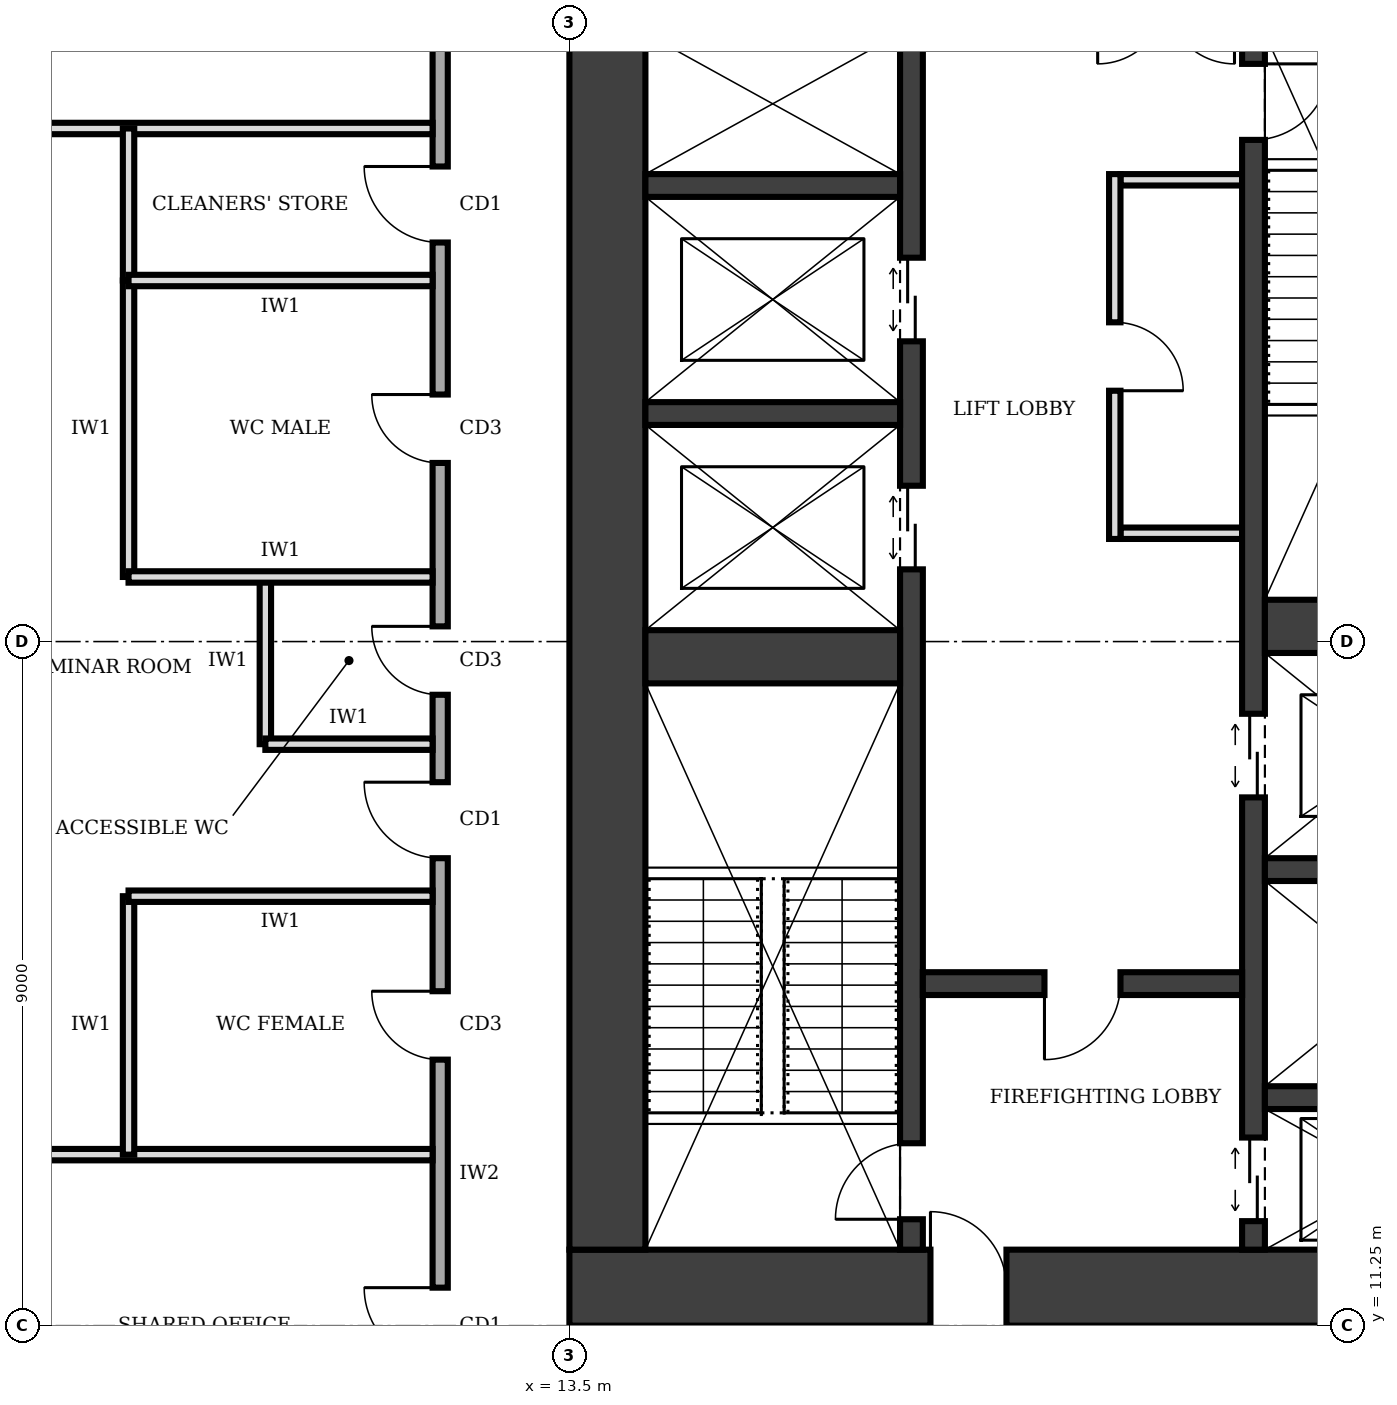
"""IFC4 building model, lengths in metres.
Left out: names, types, materials, properties, quantities, classifications, styles, units other than length and angle.
Written with IfcOpenShell. Run it as: python <this file> out.ifc"""

import sys

from ifc_helpers import new_model, si_unit, direction, frame, frame_2d, origin, place, context, subcontext, project, spatial, rectangle, extrude, element, fill, save


model = new_model("IFC4")
c1 = context("Model", 3, precision=1e-05, world=origin(), true_north=direction((0.0, 1.0)))
c2 = subcontext(c1, "Body", "Model", "MODEL_VIEW")
j1 = project(units=[si_unit("LENGTHUNIT", "METRE"), si_unit("PLANEANGLEUNIT", "RADIAN")], contexts=[c1])
p1 = place(None, origin())
s1 = spatial("IfcSite", under=j1, at=p1, CompositionType="ELEMENT")
p2 = place(p1, origin())
s2 = spatial("IfcBuilding", under=s1, at=p2, CompositionType="ELEMENT")
p3 = place(p2, frame((0.0, 0.0, 53.0)))
s3 = spatial("IfcBuildingStorey", under=s2, at=p3, CompositionType="ELEMENT", Elevation=53.0)
p4 = place(p3, frame((13.5, 11.75, 0.0), z_axis=(0.0, 0.0, 1.0), x_axis=(1.0, 0.0, 0.0)))
e1 = element("IfcWall", 1, at=p4, inside=s3, PredefinedType="SHEAR", context=c2, shape_type="SweptSolid", body=[
    extrude(rectangle(XDim=13.5, YDim=1.0, at=frame_2d((6.75, 0.0))), origin(), (0.0, 0.0, 1.0), 4.0),
])
p5 = place(p4, frame((4.75, 0.0, 0.0)))
e2 = element("IfcOpeningElement", 2, at=p5, cuts=e1, PredefinedType="OPENING", context=c2, shape_type="SweptSolid", body=[
    extrude(rectangle(XDim=1.0, YDim=2.1, at=frame_2d((0.5, 1.05))), frame((0.0, 0.51, 0.0), z_axis=(0.0, -1.0, 0.0), x_axis=(1.0, 0.0, 0.0)), (0.0, 0.0, 1.0), 1.02),
])
p6 = place(p3, frame((14.0, 28.25, 0.0), z_axis=(0.0, 0.0, 1.0), x_axis=(0.0, -1.0, 0.0)))
e3 = element("IfcWall", 3, at=p6, inside=s3, PredefinedType="SHEAR", context=c2, shape_type="SweptSolid", body=[
    extrude(rectangle(XDim=16.0, YDim=1.0, at=frame_2d((8.0, 0.0))), origin(), (0.0, 0.0, 1.0), 4.0),
])
p7 = place(p3, frame((18.0, 12.25, 0.0), z_axis=(0.0, 0.0, 1.0), x_axis=(0.0, 1.0, 0.0)))
e4 = element("IfcWall", 4, at=p7, inside=s3, PredefinedType="SHEAR", context=c2, shape_type="SweptSolid", body=[
    extrude(rectangle(XDim=16.0, YDim=0.3, at=frame_2d((8.0, 0.0))), origin(), (0.0, 0.0, 1.0), 4.0),
])
p8 = place(p7, frame((0.4, 0.0, 0.0)))
e5 = element("IfcOpeningElement", 5, at=p8, cuts=e4, PredefinedType="OPENING", context=c2, shape_type="SweptSolid", body=[
    extrude(rectangle(XDim=1.0, YDim=2.1, at=frame_2d((0.5, 1.05))), frame((0.0, 0.16, 0.0), z_axis=(0.0, -1.0, 0.0), x_axis=(1.0, 0.0, 0.0)), (0.0, 0.0, 1.0), 0.32),
])
p9 = place(p7, frame((8.95, 0.0, 0.0)))
e6 = element("IfcOpeningElement", 6, at=p9, cuts=e4, PredefinedType="OPENING", context=c2, shape_type="SweptSolid", body=[
    extrude(rectangle(XDim=1.1, YDim=2.1, at=frame_2d((0.55, 1.05))), frame((0.0, 0.16, 0.0), z_axis=(0.0, -1.0, 0.0), x_axis=(1.0, 0.0, 0.0)), (0.0, 0.0, 1.0), 0.32),
])
p10 = place(p7, frame((11.95, 0.0, 0.0)))
e7 = element("IfcOpeningElement", 7, at=p10, cuts=e4, PredefinedType="OPENING", context=c2, shape_type="SweptSolid", body=[
    extrude(rectangle(XDim=1.1, YDim=2.1, at=frame_2d((0.55, 1.05))), frame((0.0, 0.16, 0.0), z_axis=(0.0, -1.0, 0.0), x_axis=(1.0, 0.0, 0.0)), (0.0, 0.0, 1.0), 0.32),
])
p11 = place(p3, frame((22.5, 12.25, 0.0), z_axis=(0.0, 0.0, 1.0), x_axis=(0.0, 1.0, 0.0)))
e8 = element("IfcWall", 8, at=p11, inside=s3, PredefinedType="SHEAR", context=c2, shape_type="SweptSolid", body=[
    extrude(rectangle(XDim=16.0, YDim=0.3, at=frame_2d((8.0, 0.0))), origin(), (0.0, 0.0, 1.0), 4.0),
])
p12 = place(p11, frame((14.6, 0.0, 0.0)))
e9 = element("IfcOpeningElement", 9, at=p12, cuts=e8, PredefinedType="OPENING", context=c2, shape_type="SweptSolid", body=[
    extrude(rectangle(XDim=1.0, YDim=2.1, at=frame_2d((0.5, 1.05))), frame((0.0, 0.16, 0.0), z_axis=(0.0, -1.0, 0.0), x_axis=(1.0, 0.0, 0.0)), (0.0, 0.0, 1.0), 0.32),
])
p13 = place(p11, frame((0.375, 0.0, 0.0)))
e10 = element("IfcOpeningElement", 10, at=p13, cuts=e8, PredefinedType="OPENING", context=c2, shape_type="SweptSolid", body=[
    extrude(rectangle(XDim=1.1, YDim=2.1, at=frame_2d((0.55, 1.05))), frame((0.0, 0.16, 0.0), z_axis=(0.0, -1.0, 0.0), x_axis=(1.0, 0.0, 0.0)), (0.0, 0.0, 1.0), 0.32),
])
p14 = place(p11, frame((5.95, 0.0, 0.0)))
e11 = element("IfcOpeningElement", 11, at=p14, cuts=e8, PredefinedType="OPENING", context=c2, shape_type="SweptSolid", body=[
    extrude(rectangle(XDim=1.1, YDim=2.1, at=frame_2d((0.55, 1.05))), frame((0.0, 0.16, 0.0), z_axis=(0.0, -1.0, 0.0), x_axis=(1.0, 0.0, 0.0)), (0.0, 0.0, 1.0), 0.32),
])
p15 = place(p3, frame((14.5, 20.05, 0.0), z_axis=(0.0, 0.0, 1.0), x_axis=(1.0, 0.0, 0.0)))
e12 = element("IfcWall", 12, at=p15, inside=s3, PredefinedType="SHEAR", context=c2, shape_type="SweptSolid", body=[
    extrude(rectangle(XDim=3.35, YDim=0.7, at=frame_2d((1.675, 0.0))), origin(), (0.0, 0.0, 1.0), 4.0),
])
p16 = place(p3, frame((18.15, 15.75, 0.0), z_axis=(0.0, 0.0, 1.0), x_axis=(1.0, 0.0, 0.0)))
e13 = element("IfcWall", 13, at=p16, inside=s3, PredefinedType="SHEAR", context=c2, shape_type="SweptSolid", body=[
    extrude(rectangle(XDim=4.2, YDim=0.3, at=frame_2d((2.1, 0.0))), origin(), (0.0, 0.0, 1.0), 4.0),
])
p17 = place(p16, frame((1.6, 0.0, 0.0)))
e14 = element("IfcOpeningElement", 14, at=p17, cuts=e13, PredefinedType="OPENING", context=c2, shape_type="SweptSolid", body=[
    extrude(rectangle(XDim=1.0, YDim=2.1, at=frame_2d((0.5, 1.05))), frame((0.0, 0.16, 0.0), z_axis=(0.0, -1.0, 0.0), x_axis=(1.0, 0.0, 0.0)), (0.0, 0.0, 1.0), 0.32),
])
for number, where, z_axis, x_axis in (
    (15, (22.65, 14.25, 0.0), (0.0, 0.0, 1.0), (1.0, 0.0, 0.0)),
    (16, (22.65, 17.25, 0.0), (0.0, 0.0, 1.0), (1.0, 0.0, 0.0)),
):
    element("IfcWall", number, at=place(p3, frame(where, z_axis=z_axis, x_axis=x_axis)), inside=s3, PredefinedType="SHEAR", context=c2, shape_type="SweptSolid", body=[
        extrude(rectangle(XDim=3.35, YDim=0.3, at=frame_2d((1.675, 0.0))), origin(), (0.0, 0.0, 1.0), 4.0),
    ])
p18 = place(p3, frame((22.65, 20.45, 0.0), z_axis=(0.0, 0.0, 1.0), x_axis=(1.0, 0.0, 0.0)))
e17 = element("IfcWall", 17, at=p18, inside=s3, PredefinedType="SHEAR", context=c2, shape_type="SweptSolid", body=[
    extrude(rectangle(XDim=3.35, YDim=0.7, at=frame_2d((1.675, 0.0))), origin(), (0.0, 0.0, 1.0), 4.0),
])
for number, where, z_axis, x_axis in (
    (18, (14.5, 23.25, 0.0), (0.0, 0.0, 1.0), (1.0, 0.0, 0.0)),
    (19, (14.5, 26.25, 0.0), (0.0, 0.0, 1.0), (1.0, 0.0, 0.0)),
):
    element("IfcWall", number, at=place(p3, frame(where, z_axis=z_axis, x_axis=x_axis)), inside=s3, PredefinedType="SHEAR", context=c2, shape_type="SweptSolid", body=[
        extrude(rectangle(XDim=3.35, YDim=0.3, at=frame_2d((1.675, 0.0))), origin(), (0.0, 0.0, 1.0), 4.0),
    ])
p19 = place(p3, frame((20.675, 21.6, 0.0), z_axis=(0.0, 0.0, 1.0), x_axis=(0.0, 1.0, 0.0)))
e20 = element("IfcWall", 20, at=p19, inside=s3, PredefinedType="PARTITIONING", context=c2, shape_type="SweptSolid", body=[
    extrude(rectangle(XDim=4.8, YDim=0.15, at=frame_2d((2.4, 0.0))), origin(), (0.0, 0.0, 1.0), 3.75),
])
p20 = place(p19, frame((1.95, 0.0, 0.0)))
e21 = element("IfcOpeningElement", 21, at=p20, cuts=e20, PredefinedType="OPENING", context=c2, shape_type="SweptSolid", body=[
    extrude(rectangle(XDim=0.9, YDim=2.1, at=frame_2d((0.45, 1.05))), frame((0.0, 0.085, 0.0), z_axis=(0.0, -1.0, 0.0), x_axis=(1.0, 0.0, 0.0)), (0.0, 0.0, 1.0), 0.17),
])
for number, where, z_axis, x_axis in (
    (22, (20.75, 21.675, 0.0), (0.0, 0.0, 1.0), (1.0, 0.0, 0.0)),
    (23, (20.75, 26.325, 0.0), (0.0, 0.0, 1.0), (1.0, 0.0, 0.0)),
):
    element("IfcWall", number, at=place(p3, frame(where, z_axis=z_axis, x_axis=x_axis)), inside=s3, PredefinedType="PARTITIONING", context=c2, shape_type="SweptSolid", body=[
        extrude(rectangle(XDim=1.6, YDim=0.15, at=frame_2d((0.8, 0.0))), origin(), (0.0, 0.0, 1.0), 3.75),
    ])
p21 = place(p3, frame((11.8, 32.8, 0.0), z_axis=(0.0, 0.0, 1.0), x_axis=(0.0, -1.0, 0.0)))
e24 = element("IfcWall", 24, at=p21, inside=s3, PredefinedType="SOLIDWALL", context=c2, shape_type="SweptSolid", body=[
    extrude(rectangle(XDim=23.8, YDim=0.2, at=frame_2d((11.9, 0.0))), origin(), (0.0, 0.0, 1.0), 3.75),
])
p22 = place(p21, frame((21.05, 0.0, 0.0)))
e25 = element("IfcOpeningElement", 25, at=p22, cuts=e24, PredefinedType="OPENING", context=c2, shape_type="SweptSolid", body=[
    extrude(rectangle(XDim=1.0, YDim=2.1, at=frame_2d((0.5, 1.05))), frame((0.0, 0.11, 0.0), z_axis=(0.0, -1.0, 0.0), x_axis=(1.0, 0.0, 0.0)), (0.0, 0.0, 1.0), 0.22),
])
p23 = place(p21, frame((17.15, 0.0, 0.0)))
e26 = element("IfcOpeningElement", 26, at=p23, cuts=e24, PredefinedType="OPENING", context=c2, shape_type="SweptSolid", body=[
    extrude(rectangle(XDim=0.9, YDim=2.1, at=frame_2d((0.45, 1.05))), frame((0.0, 0.11, 0.0), z_axis=(0.0, -1.0, 0.0), x_axis=(1.0, 0.0, 0.0)), (0.0, 0.0, 1.0), 0.22),
])
p24 = place(p21, frame((12.35, 0.0, 0.0)))
e27 = element("IfcOpeningElement", 27, at=p24, cuts=e24, PredefinedType="OPENING", context=c2, shape_type="SweptSolid", body=[
    extrude(rectangle(XDim=0.9, YDim=2.1, at=frame_2d((0.45, 1.05))), frame((0.0, 0.11, 0.0), z_axis=(0.0, -1.0, 0.0), x_axis=(1.0, 0.0, 0.0)), (0.0, 0.0, 1.0), 0.22),
])
p25 = place(p21, frame((9.3, 0.0, 0.0)))
e28 = element("IfcOpeningElement", 28, at=p25, cuts=e24, PredefinedType="OPENING", context=c2, shape_type="SweptSolid", body=[
    extrude(rectangle(XDim=0.9, YDim=2.1, at=frame_2d((0.45, 1.05))), frame((0.0, 0.11, 0.0), z_axis=(0.0, -1.0, 0.0), x_axis=(1.0, 0.0, 0.0)), (0.0, 0.0, 1.0), 0.22),
])
p26 = place(p21, frame((6.3, 0.0, 0.0)))
e29 = element("IfcOpeningElement", 29, at=p26, cuts=e24, PredefinedType="OPENING", context=c2, shape_type="SweptSolid", body=[
    extrude(rectangle(XDim=1.0, YDim=2.1, at=frame_2d((0.5, 1.05))), frame((0.0, 0.11, 0.0), z_axis=(0.0, -1.0, 0.0), x_axis=(1.0, 0.0, 0.0)), (0.0, 0.0, 1.0), 0.22),
])
p27 = place(p21, frame((14.4, 0.0, 0.0)))
e30 = element("IfcOpeningElement", 30, at=p27, cuts=e24, PredefinedType="OPENING", context=c2, shape_type="SweptSolid", body=[
    extrude(rectangle(XDim=1.0, YDim=2.1, at=frame_2d((0.5, 1.05))), frame((0.0, 0.11, 0.0), z_axis=(0.0, -1.0, 0.0), x_axis=(1.0, 0.0, 0.0)), (0.0, 0.0, 1.0), 0.22),
])
p28 = place(p21, frame((2.3, 0.0, 0.0)))
e31 = element("IfcOpeningElement", 31, at=p28, cuts=e24, PredefinedType="OPENING", context=c2, shape_type="SweptSolid", body=[
    extrude(rectangle(XDim=1.0, YDim=2.1, at=frame_2d((0.5, 1.05))), frame((0.0, 0.11, 0.0), z_axis=(0.0, -1.0, 0.0), x_axis=(1.0, 0.0, 0.0)), (0.0, 0.0, 1.0), 0.22),
])
for number, where, z_axis, x_axis in (
    (32, (0.3, 13.5, 0.0), (0.0, 0.0, 1.0), (1.0, 0.0, 0.0)),
    (33, (0.3, 27.0, 0.0), (0.0, 0.0, 1.0), (1.0, 0.0, 0.0)),
):
    element("IfcWall", number, at=place(p3, frame(where, z_axis=z_axis, x_axis=x_axis)), inside=s3, PredefinedType="PARTITIONING", context=c2, shape_type="SweptSolid", body=[
        extrude(rectangle(XDim=11.4, YDim=0.15, at=frame_2d((5.7, 0.0))), origin(), (0.0, 0.0, 1.0), 3.75),
    ])
p29 = place(p3, frame((11.7, 16.9, 0.0), z_axis=(0.0, 0.0, 1.0), x_axis=(-1.0, 0.0, 0.0)))
e34 = element("IfcWall", 34, at=p29, inside=s3, PredefinedType="PARTITIONING", context=c2, shape_type="SweptSolid", body=[
    extrude(rectangle(XDim=4.0, YDim=0.15, at=frame_2d((2.0, 0.0))), origin(), (0.0, 0.0, 1.0), 3.75),
])
p30 = place(p3, frame((11.7, 18.9, 0.0), z_axis=(0.0, 0.0, 1.0), x_axis=(-1.0, 0.0, 0.0)))
e35 = element("IfcWall", 35, at=p30, inside=s3, PredefinedType="PARTITIONING", context=c2, shape_type="SweptSolid", body=[
    extrude(rectangle(XDim=2.2, YDim=0.15, at=frame_2d((1.1, 0.0))), origin(), (0.0, 0.0, 1.0), 3.75),
])
p31 = place(p3, frame((11.7, 21.1, 0.0), z_axis=(0.0, 0.0, 1.0), x_axis=(-1.0, 0.0, 0.0)))
e36 = element("IfcWall", 36, at=p31, inside=s3, PredefinedType="PARTITIONING", context=c2, shape_type="SweptSolid", body=[
    extrude(rectangle(XDim=4.0, YDim=0.15, at=frame_2d((2.0, 0.0))), origin(), (0.0, 0.0, 1.0), 2.85),
])
p32 = place(p3, frame((11.7, 25.0, 0.0), z_axis=(0.0, 0.0, 1.0), x_axis=(-1.0, 0.0, 0.0)))
e37 = element("IfcWall", 37, at=p32, inside=s3, PredefinedType="PARTITIONING", context=c2, shape_type="SweptSolid", body=[
    extrude(rectangle(XDim=4.0, YDim=0.15, at=frame_2d((2.0, 0.0))), origin(), (0.0, 0.0, 1.0), 3.75),
])
p33 = place(p3, frame((7.7, 13.5, 0.0), z_axis=(0.0, 0.0, 1.0), x_axis=(0.0, 1.0, 0.0)))
e38 = element("IfcWall", 38, at=p33, inside=s3, PredefinedType="PARTITIONING", context=c2, shape_type="SweptSolid", body=[
    extrude(rectangle(XDim=3.4, YDim=0.15, at=frame_2d((1.7, 0.0))), origin(), (0.0, 0.0, 1.0), 3.75),
])
p34 = place(p3, frame((9.5, 18.9, 0.0), z_axis=(0.0, 0.0, 1.0), x_axis=(0.0, 1.0, 0.0)))
e39 = element("IfcWall", 39, at=p34, inside=s3, PredefinedType="PARTITIONING", context=c2, shape_type="SweptSolid", body=[
    extrude(rectangle(XDim=2.2, YDim=0.15, at=frame_2d((1.1, 0.0))), origin(), (0.0, 0.0, 1.0), 3.75),
])
p35 = place(p3, frame((7.7, 21.1, 0.0), z_axis=(0.0, 0.0, 1.0), x_axis=(0.0, 1.0, 0.0)))
e40 = element("IfcWall", 40, at=p35, inside=s3, PredefinedType="PARTITIONING", context=c2, shape_type="SweptSolid", body=[
    extrude(rectangle(XDim=3.9, YDim=0.15, at=frame_2d((1.95, 0.0))), origin(), (0.0, 0.0, 1.0), 3.75),
])
p36 = place(p3, frame((7.7, 25.0, 0.0), z_axis=(0.0, 0.0, 1.0), x_axis=(0.0, 1.0, 0.0)))
e41 = element("IfcWall", 41, at=p36, inside=s3, PredefinedType="PARTITIONING", context=c2, shape_type="SweptSolid", body=[
    extrude(rectangle(XDim=2.0, YDim=0.15, at=frame_2d((1.0, 0.0))), origin(), (0.0, 0.0, 1.0), 3.75),
])
p37 = place(p5, origin())
e42 = element("IfcDoor", 42, at=p37, inside=s3, OperationType="SINGLE_SWING_LEFT", PredefinedType="DOOR", context=c2, shape_type="SweptSolid", body=[
    extrude(rectangle(XDim=1.0, YDim=2.1, at=frame_2d((0.5, 1.05))), frame((0.0, 0.025, 0.0), z_axis=(0.0, -1.0, 0.0), x_axis=(1.0, 0.0, 0.0)), (0.0, 0.0, 1.0), 0.05),
])
fill(e2, e42)
p38 = place(p17, frame((1.0, 0.0, 0.0), z_axis=(0.0, 0.0, 1.0), x_axis=(-1.0, 0.0, 0.0)))
e43 = element("IfcDoor", 43, at=p38, inside=s3, OperationType="SINGLE_SWING_RIGHT", PredefinedType="DOOR", context=c2, shape_type="SweptSolid", body=[
    extrude(rectangle(XDim=1.0, YDim=2.1, at=frame_2d((0.5, 1.05))), frame((0.0, 0.025, 0.0), z_axis=(0.0, -1.0, 0.0), x_axis=(1.0, 0.0, 0.0)), (0.0, 0.0, 1.0), 0.05),
])
fill(e14, e43)
p39 = place(p8, origin())
e44 = element("IfcDoor", 44, at=p39, inside=s3, OperationType="SINGLE_SWING_LEFT", PredefinedType="DOOR", context=c2, shape_type="SweptSolid", body=[
    extrude(rectangle(XDim=1.0, YDim=2.1, at=frame_2d((0.5, 1.05))), frame((0.0, 0.025, 0.0), z_axis=(0.0, -1.0, 0.0), x_axis=(1.0, 0.0, 0.0)), (0.0, 0.0, 1.0), 0.05),
])
fill(e5, e44)
p40 = place(p12, frame((1.0, 0.0, 0.0), z_axis=(0.0, 0.0, 1.0), x_axis=(-1.0, 0.0, 0.0)))
e45 = element("IfcDoor", 45, at=p40, inside=s3, OperationType="SINGLE_SWING_LEFT", PredefinedType="DOOR", context=c2, shape_type="SweptSolid", body=[
    extrude(rectangle(XDim=1.0, YDim=2.1, at=frame_2d((0.5, 1.05))), frame((0.0, 0.025, 0.0), z_axis=(0.0, -1.0, 0.0), x_axis=(1.0, 0.0, 0.0)), (0.0, 0.0, 1.0), 0.05),
])
fill(e9, e45)
p41 = place(p13, origin())
e46 = element("IfcDoor", 46, at=p41, inside=s3, OperationType="DOUBLE_DOOR_SLIDING", PredefinedType="DOOR", context=c2, shape_type="SweptSolid", body=[
    extrude(rectangle(XDim=1.1, YDim=2.1, at=frame_2d((0.55, 1.05))), frame((0.0, 0.025, 0.0), z_axis=(0.0, -1.0, 0.0), x_axis=(1.0, 0.0, 0.0)), (0.0, 0.0, 1.0), 0.05),
])
fill(e10, e46)
p42 = place(p9, origin())
e47 = element("IfcDoor", 47, at=p42, inside=s3, OperationType="DOUBLE_DOOR_SLIDING", PredefinedType="DOOR", context=c2, shape_type="SweptSolid", body=[
    extrude(rectangle(XDim=1.1, YDim=2.1, at=frame_2d((0.55, 1.05))), frame((0.0, 0.025, 0.0), z_axis=(0.0, -1.0, 0.0), x_axis=(1.0, 0.0, 0.0)), (0.0, 0.0, 1.0), 0.05),
])
fill(e6, e47)
p43 = place(p10, origin())
e48 = element("IfcDoor", 48, at=p43, inside=s3, OperationType="DOUBLE_DOOR_SLIDING", PredefinedType="DOOR", context=c2, shape_type="SweptSolid", body=[
    extrude(rectangle(XDim=1.1, YDim=2.1, at=frame_2d((0.55, 1.05))), frame((0.0, 0.025, 0.0), z_axis=(0.0, -1.0, 0.0), x_axis=(1.0, 0.0, 0.0)), (0.0, 0.0, 1.0), 0.05),
])
fill(e7, e48)
p44 = place(p14, origin())
e49 = element("IfcDoor", 49, at=p44, inside=s3, OperationType="DOUBLE_DOOR_SLIDING", PredefinedType="DOOR", context=c2, shape_type="SweptSolid", body=[
    extrude(rectangle(XDim=1.1, YDim=2.1, at=frame_2d((0.55, 1.05))), frame((0.0, 0.025, 0.0), z_axis=(0.0, -1.0, 0.0), x_axis=(1.0, 0.0, 0.0)), (0.0, 0.0, 1.0), 0.05),
])
fill(e11, e49)
p45 = place(p20, frame((0.9, 0.0, 0.0), z_axis=(0.0, 0.0, 1.0), x_axis=(-1.0, 0.0, 0.0)))
e50 = element("IfcDoor", 50, at=p45, inside=s3, OperationType="SINGLE_SWING_RIGHT", PredefinedType="DOOR", context=c2, shape_type="SweptSolid", body=[
    extrude(rectangle(XDim=0.9, YDim=2.1, at=frame_2d((0.45, 1.05))), frame((0.0, 0.025, 0.0), z_axis=(0.0, -1.0, 0.0), x_axis=(1.0, 0.0, 0.0)), (0.0, 0.0, 1.0), 0.05),
])
fill(e21, e50)
p46 = place(p22, frame((1.0, 0.0, 0.0), z_axis=(0.0, 0.0, 1.0), x_axis=(-1.0, 0.0, 0.0)))
e51 = element("IfcDoor", 51, at=p46, inside=s3, OperationType="SINGLE_SWING_RIGHT", PredefinedType="DOOR", context=c2, shape_type="SweptSolid", body=[
    extrude(rectangle(XDim=1.0, YDim=2.1, at=frame_2d((0.5, 1.05))), frame((0.0, 0.025, 0.0), z_axis=(0.0, -1.0, 0.0), x_axis=(1.0, 0.0, 0.0)), (0.0, 0.0, 1.0), 0.05),
])
fill(e25, e51)
p47 = place(p23, frame((0.9, 0.0, 0.0), z_axis=(0.0, 0.0, 1.0), x_axis=(-1.0, 0.0, 0.0)))
e52 = element("IfcDoor", 52, at=p47, inside=s3, OperationType="SINGLE_SWING_RIGHT", PredefinedType="DOOR", context=c2, shape_type="SweptSolid", body=[
    extrude(rectangle(XDim=0.9, YDim=2.1, at=frame_2d((0.45, 1.05))), frame((0.0, 0.025, 0.0), z_axis=(0.0, -1.0, 0.0), x_axis=(1.0, 0.0, 0.0)), (0.0, 0.0, 1.0), 0.05),
])
fill(e26, e52)
p48 = place(p24, frame((0.9, 0.0, 0.0), z_axis=(0.0, 0.0, 1.0), x_axis=(-1.0, 0.0, 0.0)))
e53 = element("IfcDoor", 53, at=p48, inside=s3, OperationType="SINGLE_SWING_RIGHT", PredefinedType="DOOR", context=c2, shape_type="SweptSolid", body=[
    extrude(rectangle(XDim=0.9, YDim=2.1, at=frame_2d((0.45, 1.05))), frame((0.0, 0.025, 0.0), z_axis=(0.0, -1.0, 0.0), x_axis=(1.0, 0.0, 0.0)), (0.0, 0.0, 1.0), 0.05),
])
fill(e27, e53)
p49 = place(p25, frame((0.9, 0.0, 0.0), z_axis=(0.0, 0.0, 1.0), x_axis=(-1.0, 0.0, 0.0)))
e54 = element("IfcDoor", 54, at=p49, inside=s3, OperationType="SINGLE_SWING_RIGHT", PredefinedType="DOOR", context=c2, shape_type="SweptSolid", body=[
    extrude(rectangle(XDim=0.9, YDim=2.1, at=frame_2d((0.45, 1.05))), frame((0.0, 0.025, 0.0), z_axis=(0.0, -1.0, 0.0), x_axis=(1.0, 0.0, 0.0)), (0.0, 0.0, 1.0), 0.05),
])
fill(e28, e54)
p50 = place(p26, frame((1.0, 0.0, 0.0), z_axis=(0.0, 0.0, 1.0), x_axis=(-1.0, 0.0, 0.0)))
e55 = element("IfcDoor", 55, at=p50, inside=s3, OperationType="SINGLE_SWING_RIGHT", PredefinedType="DOOR", context=c2, shape_type="SweptSolid", body=[
    extrude(rectangle(XDim=1.0, YDim=2.1, at=frame_2d((0.5, 1.05))), frame((0.0, 0.025, 0.0), z_axis=(0.0, -1.0, 0.0), x_axis=(1.0, 0.0, 0.0)), (0.0, 0.0, 1.0), 0.05),
])
fill(e29, e55)
p51 = place(p27, frame((1.0, 0.0, 0.0), z_axis=(0.0, 0.0, 1.0), x_axis=(-1.0, 0.0, 0.0)))
e56 = element("IfcDoor", 56, at=p51, inside=s3, OperationType="SINGLE_SWING_RIGHT", PredefinedType="DOOR", context=c2, shape_type="SweptSolid", body=[
    extrude(rectangle(XDim=1.0, YDim=2.1, at=frame_2d((0.5, 1.05))), frame((0.0, 0.025, 0.0), z_axis=(0.0, -1.0, 0.0), x_axis=(1.0, 0.0, 0.0)), (0.0, 0.0, 1.0), 0.05),
])
fill(e30, e56)
save(model, sys.argv[1])
